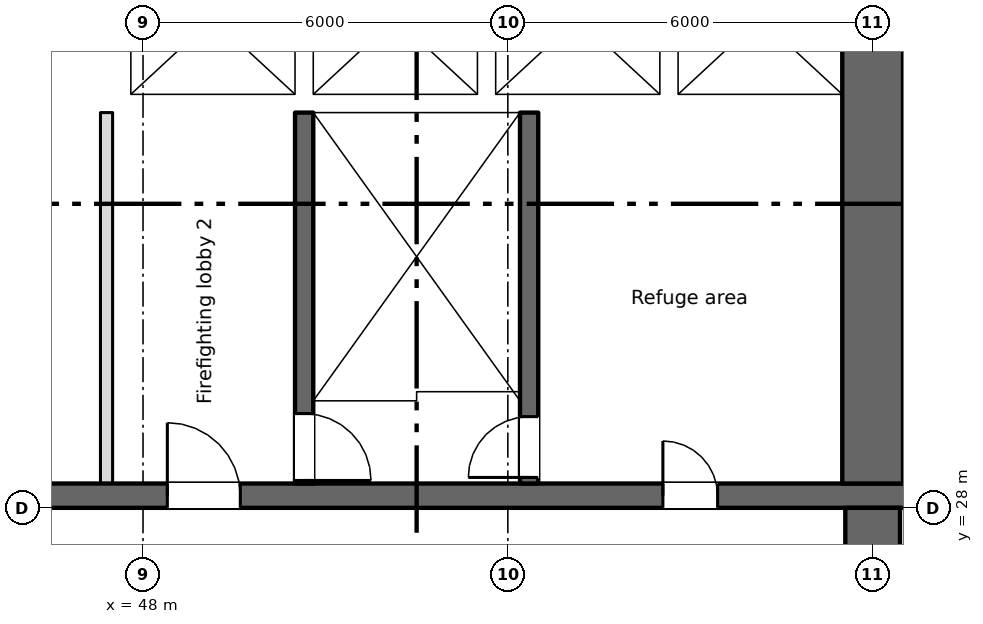
"""IFC4 building model, lengths in metres.
Left out: names, types, materials, properties, quantities, classifications, styles, units other than length and angle.
Written with IfcOpenShell. Run it as: python <this file> out.ifc"""

import sys

from ifc_helpers import new_model, si_unit, direction, frame, frame_2d, origin, place, context, subcontext, project, spatial, rectangle, extrude, element, fill, save


model = new_model("IFC4")
c1 = context("Model", 3, precision=1e-05, world=origin(), true_north=direction((0.0, 1.0)))
c2 = subcontext(c1, "Body", "Model", "MODEL_VIEW")
j1 = project(units=[si_unit("LENGTHUNIT", "METRE"), si_unit("PLANEANGLEUNIT", "RADIAN")], contexts=[c1])
p1 = place(None, origin())
s1 = spatial("IfcSite", under=j1, at=p1, CompositionType="ELEMENT")
p2 = place(p1, origin())
s2 = spatial("IfcBuilding", under=s1, at=p2, CompositionType="ELEMENT")
p3 = place(p2, frame((0.0, 0.0, 226.75)))
s3 = spatial("IfcBuildingStorey", under=s2, at=p3, CompositionType="ELEMENT", Elevation=226.75)
p4 = place(p3, frame((60.0, 4.4, 0.0), z_axis=(0.0, 0.0, 1.0), x_axis=(0.0, 1.0, 0.0)))
e1 = element("IfcWall", 1, at=p4, inside=s3, PredefinedType="SHEAR", context=c2, shape_type="SweptSolid", body=[
    extrude(rectangle(XDim=23.6, YDim=0.9, at=frame_2d((11.8, 0.0))), origin(), (0.0, 0.0, 1.0), 4.2),
])
p5 = place(p4, frame((21.5, 0.0, 0.0)))
e2 = element("IfcOpeningElement", 2, at=p5, cuts=e1, PredefinedType="OPENING", context=c2, shape_type="SweptSolid", body=[
    extrude(rectangle(XDim=1.2, YDim=2.1, at=frame_2d((0.6, 1.05))), frame((0.0, 0.46, 0.0), z_axis=(0.0, -1.0, 0.0), x_axis=(1.0, 0.0, 0.0)), (0.0, 0.0, 1.0), 0.92),
])
p6 = place(p3, frame((6.6, 28.2, 0.0), z_axis=(0.0, 0.0, 1.0), x_axis=(1.0, 0.0, 0.0)))
e3 = element("IfcWall", 3, at=p6, inside=s3, PredefinedType="SHEAR", context=c2, shape_type="SweptSolid", body=[
    extrude(rectangle(XDim=57.9, YDim=0.4, at=frame_2d((28.95, 0.0))), origin(), (0.0, 0.0, 1.0), 4.2),
])
p7 = place(p6, frame((13.95, 0.0, 0.0)))
e4 = element("IfcOpeningElement", 4, at=p7, cuts=e3, PredefinedType="OPENING", context=c2, shape_type="SweptSolid", body=[
    extrude(rectangle(XDim=0.9, YDim=2.1, at=frame_2d((0.45, 1.05))), frame((0.0, 0.21, 0.0), z_axis=(0.0, -1.0, 0.0), x_axis=(1.0, 0.0, 0.0)), (0.0, 0.0, 1.0), 0.42),
])
p8 = place(p6, frame((49.95, 0.0, 0.0)))
e5 = element("IfcOpeningElement", 5, at=p8, cuts=e3, PredefinedType="OPENING", context=c2, shape_type="SweptSolid", body=[
    extrude(rectangle(XDim=0.9, YDim=2.1, at=frame_2d((0.45, 1.05))), frame((0.0, 0.21, 0.0), z_axis=(0.0, -1.0, 0.0), x_axis=(1.0, 0.0, 0.0)), (0.0, 0.0, 1.0), 0.42),
])
p9 = place(p6, frame((1.45, 0.0, 0.0)))
e6 = element("IfcOpeningElement", 6, at=p9, cuts=e3, PredefinedType="OPENING", context=c2, shape_type="SweptSolid", body=[
    extrude(rectangle(XDim=0.9, YDim=2.1, at=frame_2d((0.45, 1.05))), frame((0.0, 0.21, 0.0), z_axis=(0.0, -1.0, 0.0), x_axis=(1.0, 0.0, 0.0)), (0.0, 0.0, 1.0), 0.42),
])
p10 = place(p6, frame((4.8, 0.0, 0.0)))
e7 = element("IfcOpeningElement", 7, at=p10, cuts=e3, PredefinedType="OPENING", context=c2, shape_type="SweptSolid", body=[
    extrude(rectangle(XDim=1.2, YDim=2.1, at=frame_2d((0.6, 1.05))), frame((0.0, 0.21, 0.0), z_axis=(0.0, -1.0, 0.0), x_axis=(1.0, 0.0, 0.0)), (0.0, 0.0, 1.0), 0.42),
])
p11 = place(p6, frame((31.8, 0.0, 0.0)))
e8 = element("IfcOpeningElement", 8, at=p11, cuts=e3, PredefinedType="OPENING", context=c2, shape_type="SweptSolid", body=[
    extrude(rectangle(XDim=1.2, YDim=2.1, at=frame_2d((0.6, 1.05))), frame((0.0, 0.21, 0.0), z_axis=(0.0, -1.0, 0.0), x_axis=(1.0, 0.0, 0.0)), (0.0, 0.0, 1.0), 0.42),
])
p12 = place(p6, frame((55.3, 0.0, 0.0)))
e9 = element("IfcOpeningElement", 9, at=p12, cuts=e3, PredefinedType="OPENING", context=c2, shape_type="SweptSolid", body=[
    extrude(rectangle(XDim=1.2, YDim=2.1, at=frame_2d((0.6, 1.05))), frame((0.0, 0.21, 0.0), z_axis=(0.0, -1.0, 0.0), x_axis=(1.0, 0.0, 0.0)), (0.0, 0.0, 1.0), 0.42),
])
p13 = place(p6, frame((21.8, 0.0, 0.0)))
e10 = element("IfcOpeningElement", 10, at=p13, cuts=e3, PredefinedType="OPENING", context=c2, shape_type="SweptSolid", body=[
    extrude(rectangle(XDim=1.2, YDim=2.1, at=frame_2d((0.6, 1.05))), frame((0.0, 0.21, 0.0), z_axis=(0.0, -1.0, 0.0), x_axis=(1.0, 0.0, 0.0)), (0.0, 0.0, 1.0), 0.42),
])
p14 = place(p6, frame((41.8, 0.0, 0.0)))
e11 = element("IfcOpeningElement", 11, at=p14, cuts=e3, PredefinedType="OPENING", context=c2, shape_type="SweptSolid", body=[
    extrude(rectangle(XDim=1.2, YDim=2.1, at=frame_2d((0.6, 1.05))), frame((0.0, 0.21, 0.0), z_axis=(0.0, -1.0, 0.0), x_axis=(1.0, 0.0, 0.0)), (0.0, 0.0, 1.0), 0.42),
])
p15 = place(p6, frame((24.95, 0.0, 0.0)))
e12 = element("IfcOpeningElement", 12, at=p15, cuts=e3, PredefinedType="OPENING", context=c2, shape_type="SweptSolid", body=[
    extrude(rectangle(XDim=2.4, YDim=2.1, at=frame_2d((1.2, 1.05))), frame((0.0, 0.21, 0.0), z_axis=(0.0, -1.0, 0.0), x_axis=(1.0, 0.0, 0.0)), (0.0, 0.0, 1.0), 0.42),
])
p16 = place(p6, frame((37.45, 0.0, 0.0)))
e13 = element("IfcOpeningElement", 13, at=p16, cuts=e3, PredefinedType="OPENING", context=c2, shape_type="SweptSolid", body=[
    extrude(rectangle(XDim=2.4, YDim=2.1, at=frame_2d((1.2, 1.05))), frame((0.0, 0.21, 0.0), z_axis=(0.0, -1.0, 0.0), x_axis=(1.0, 0.0, 0.0)), (0.0, 0.0, 1.0), 0.42),
])
p17 = place(p6, frame((7.95, 0.0, 0.0)))
e14 = element("IfcOpeningElement", 14, at=p17, cuts=e3, PredefinedType="OPENING", context=c2, shape_type="SweptSolid", body=[
    extrude(rectangle(XDim=2.4, YDim=2.1, at=frame_2d((1.2, 1.05))), frame((0.0, 0.21, 0.0), z_axis=(0.0, -1.0, 0.0), x_axis=(1.0, 0.0, 0.0)), (0.0, 0.0, 1.0), 0.42),
])
p18 = place(p6, frame((28.95, 0.0, 0.0)))
e15 = element("IfcOpeningElement", 15, at=p18, cuts=e3, PredefinedType="OPENING", context=c2, shape_type="SweptSolid", body=[
    extrude(rectangle(XDim=0.9, YDim=2.1, at=frame_2d((0.45, 1.05))), frame((0.0, 0.21, 0.0), z_axis=(0.0, -1.0, 0.0), x_axis=(1.0, 0.0, 0.0)), (0.0, 0.0, 1.0), 0.42),
])
p19 = place(p6, frame((34.95, 0.0, 0.0)))
e16 = element("IfcOpeningElement", 16, at=p19, cuts=e3, PredefinedType="OPENING", context=c2, shape_type="SweptSolid", body=[
    extrude(rectangle(XDim=0.9, YDim=2.1, at=frame_2d((0.45, 1.05))), frame((0.0, 0.21, 0.0), z_axis=(0.0, -1.0, 0.0), x_axis=(1.0, 0.0, 0.0)), (0.0, 0.0, 1.0), 0.42),
])
p20 = place(p3, frame((60.0, 28.4, 0.0), z_axis=(0.0, 0.0, 1.0), x_axis=(0.0, 1.0, 0.0)))
e17 = element("IfcWall", 17, at=p20, inside=s3, PredefinedType="SHEAR", context=c2, shape_type="SweptSolid", body=[
    extrude(rectangle(XDim=16.9, YDim=1.0, at=frame_2d((8.45, 0.0))), origin(), (0.0, 0.0, 1.0), 4.2),
])
p21 = place(p20, frame((9.6, 0.0, 0.0)))
e18 = element("IfcOpeningElement", 18, at=p21, cuts=e17, PredefinedType="OPENING", context=c2, shape_type="SweptSolid", body=[
    extrude(rectangle(XDim=2.0, YDim=2.1, at=frame_2d((1.0, 1.05))), frame((0.0, 0.51, 0.0), z_axis=(0.0, -1.0, 0.0), x_axis=(1.0, 0.0, 0.0)), (0.0, 0.0, 1.0), 1.02),
])
p22 = place(p20, frame((15.4, 0.0, 0.0)))
e19 = element("IfcOpeningElement", 19, at=p22, cuts=e17, PredefinedType="OPENING", context=c2, shape_type="SweptSolid", body=[
    extrude(rectangle(XDim=1.2, YDim=2.1, at=frame_2d((0.6, 1.05))), frame((0.0, 0.51, 0.0), z_axis=(0.0, -1.0, 0.0), x_axis=(1.0, 0.0, 0.0)), (0.0, 0.0, 1.0), 1.02),
])
p23 = place(p3, frame((50.65, 34.5, 0.0), z_axis=(0.0, 0.0, 1.0), x_axis=(0.0, -1.0, 0.0)))
e20 = element("IfcWall", 20, at=p23, inside=s3, PredefinedType="SHEAR", context=c2, shape_type="SweptSolid", body=[
    extrude(rectangle(XDim=6.1, YDim=0.3, at=frame_2d((3.05, 0.0))), origin(), (0.0, 0.0, 1.0), 4.2),
])
p24 = place(p23, frame((4.95, 0.0, 0.0)))
e21 = element("IfcOpeningElement", 21, at=p24, cuts=e20, PredefinedType="OPENING", context=c2, shape_type="SweptSolid", body=[
    extrude(rectangle(XDim=1.1, YDim=2.1, at=frame_2d((0.55, 1.05))), frame((0.0, 0.16, 0.0), z_axis=(0.0, -1.0, 0.0), x_axis=(1.0, 0.0, 0.0)), (0.0, 0.0, 1.0), 0.32),
])
p25 = place(p3, frame((54.35, 28.4, 0.0), z_axis=(0.0, 0.0, 1.0), x_axis=(0.0, 1.0, 0.0)))
e22 = element("IfcWall", 22, at=p25, inside=s3, PredefinedType="SHEAR", context=c2, shape_type="SweptSolid", body=[
    extrude(rectangle(XDim=6.1, YDim=0.3, at=frame_2d((3.05, 0.0))), origin(), (0.0, 0.0, 1.0), 4.2),
])
p26 = place(p25, frame((0.1, 0.0, 0.0)))
e23 = element("IfcOpeningElement", 23, at=p26, cuts=e22, PredefinedType="OPENING", context=c2, shape_type="SweptSolid", body=[
    extrude(rectangle(XDim=1.0, YDim=2.1, at=frame_2d((0.5, 1.05))), frame((0.0, 0.16, 0.0), z_axis=(0.0, -1.0, 0.0), x_axis=(1.0, 0.0, 0.0)), (0.0, 0.0, 1.0), 0.32),
])
p27 = place(p3, frame((60.65, 28.4, 0.0), z_axis=(0.0, 0.0, 1.0), x_axis=(0.0, 1.0, 0.0)))
e24 = element("IfcWall", 24, at=p27, inside=s3, PredefinedType="SHEAR", context=c2, shape_type="SweptSolid", body=[
    extrude(rectangle(XDim=6.1, YDim=0.3, at=frame_2d((3.05, 0.0))), origin(), (0.0, 0.0, 1.0), 4.2),
])
p28 = place(p3, frame((47.3, 34.65, 0.0), z_axis=(0.0, 0.0, 1.0), x_axis=(1.0, 0.0, 0.0)))
e25 = element("IfcWall", 25, at=p28, inside=s3, PredefinedType="SHEAR", context=c2, shape_type="SweptSolid", body=[
    extrude(rectangle(XDim=12.2, YDim=0.3, at=frame_2d((6.1, 0.0))), origin(), (0.0, 0.0, 1.0), 4.2),
])
p29 = place(p28, frame((1.3, 0.0, 0.0)))
e26 = element("IfcOpeningElement", 26, at=p29, cuts=e25, PredefinedType="OPENING", context=c2, shape_type="SweptSolid", body=[
    extrude(rectangle(XDim=1.1, YDim=2.1, at=frame_2d((0.55, 1.05))), frame((0.0, 0.16, 0.0), z_axis=(0.0, -1.0, 0.0), x_axis=(1.0, 0.0, 0.0)), (0.0, 0.0, 1.0), 0.32),
])
p30 = place(p3, frame((47.55, 34.8, 0.0), z_axis=(0.0, 0.0, 1.0), x_axis=(0.0, 1.0, 0.0)))
e27 = element("IfcWall", 27, at=p30, inside=s3, PredefinedType="SHEAR", context=c2, shape_type="SweptSolid", body=[
    extrude(rectangle(XDim=2.5, YDim=0.5, at=frame_2d((1.25, 0.0))), origin(), (0.0, 0.0, 1.0), 4.2),
])
for number, where, z_axis, x_axis in (
    (28, (50.65, 34.8, 0.0), (0.0, 0.0, 1.0), (0.0, 1.0, 0.0)),
    (29, (53.65, 34.8, 0.0), (0.0, 0.0, 1.0), (0.0, 1.0, 0.0)),
    (30, (56.65, 34.8, 0.0), (0.0, 0.0, 1.0), (0.0, 1.0, 0.0)),
):
    element("IfcWall", number, at=place(p3, frame(where, z_axis=z_axis, x_axis=x_axis)), inside=s3, PredefinedType="SHEAR", context=c2, shape_type="SweptSolid", body=[
        extrude(rectangle(XDim=2.5, YDim=0.3, at=frame_2d((1.25, 0.0))), origin(), (0.0, 0.0, 1.0), 4.2),
    ])
p31 = place(p3, frame((47.4, 28.4, 0.0), z_axis=(0.0, 0.0, 1.0), x_axis=(0.0, 1.0, 0.0)))
e31 = element("IfcWall", 31, at=p31, inside=s3, PredefinedType="PARTITIONING", context=c2, shape_type="SweptSolid", body=[
    extrude(rectangle(XDim=6.1, YDim=0.2, at=frame_2d((3.05, 0.0))), origin(), (0.0, 0.0, 1.0), 4.2),
])
p32 = place(p8, origin())
e32 = element("IfcDoor", 32, at=p32, inside=s3, OperationType="SINGLE_SWING_LEFT", PredefinedType="DOOR", context=c2, shape_type="SweptSolid", body=[
    extrude(rectangle(XDim=0.9, YDim=2.1, at=frame_2d((0.45, 1.05))), frame((0.0, 0.025, 0.0), z_axis=(0.0, -1.0, 0.0), x_axis=(1.0, 0.0, 0.0)), (0.0, 0.0, 1.0), 0.05),
])
fill(e5, e32)
p33 = place(p26, origin())
e33 = element("IfcDoor", 33, at=p33, inside=s3, OperationType="SINGLE_SWING_LEFT", PredefinedType="DOOR", context=c2, shape_type="SweptSolid", body=[
    extrude(rectangle(XDim=1.0, YDim=2.1, at=frame_2d((0.5, 1.05))), frame((0.0, 0.025, 0.0), z_axis=(0.0, -1.0, 0.0), x_axis=(1.0, 0.0, 0.0)), (0.0, 0.0, 1.0), 0.05),
])
fill(e23, e33)
p34 = place(p29, origin())
e34 = element("IfcDoor", 34, at=p34, inside=s3, OperationType="SLIDING_TO_LEFT", PredefinedType="DOOR", context=c2, shape_type="SweptSolid", body=[
    extrude(rectangle(XDim=1.1, YDim=2.1, at=frame_2d((0.55, 1.05))), frame((0.0, 0.025, 0.0), z_axis=(0.0, -1.0, 0.0), x_axis=(1.0, 0.0, 0.0)), (0.0, 0.0, 1.0), 0.05),
])
fill(e26, e34)
p35 = place(p24, origin())
e35 = element("IfcDoor", 35, at=p35, inside=s3, OperationType="SINGLE_SWING_RIGHT", PredefinedType="DOOR", context=c2, shape_type="SweptSolid", body=[
    extrude(rectangle(XDim=1.1, YDim=2.1, at=frame_2d((0.55, 1.05))), frame((0.0, 0.025, 0.0), z_axis=(0.0, -1.0, 0.0), x_axis=(1.0, 0.0, 0.0)), (0.0, 0.0, 1.0), 0.05),
])
fill(e21, e35)
p36 = place(p14, origin())
e36 = element("IfcDoor", 36, at=p36, inside=s3, OperationType="SINGLE_SWING_LEFT", PredefinedType="DOOR", context=c2, shape_type="SweptSolid", body=[
    extrude(rectangle(XDim=1.2, YDim=2.1, at=frame_2d((0.6, 1.05))), frame((0.0, 0.025, 0.0), z_axis=(0.0, -1.0, 0.0), x_axis=(1.0, 0.0, 0.0)), (0.0, 0.0, 1.0), 0.05),
])
fill(e11, e36)
save(model, sys.argv[1])
